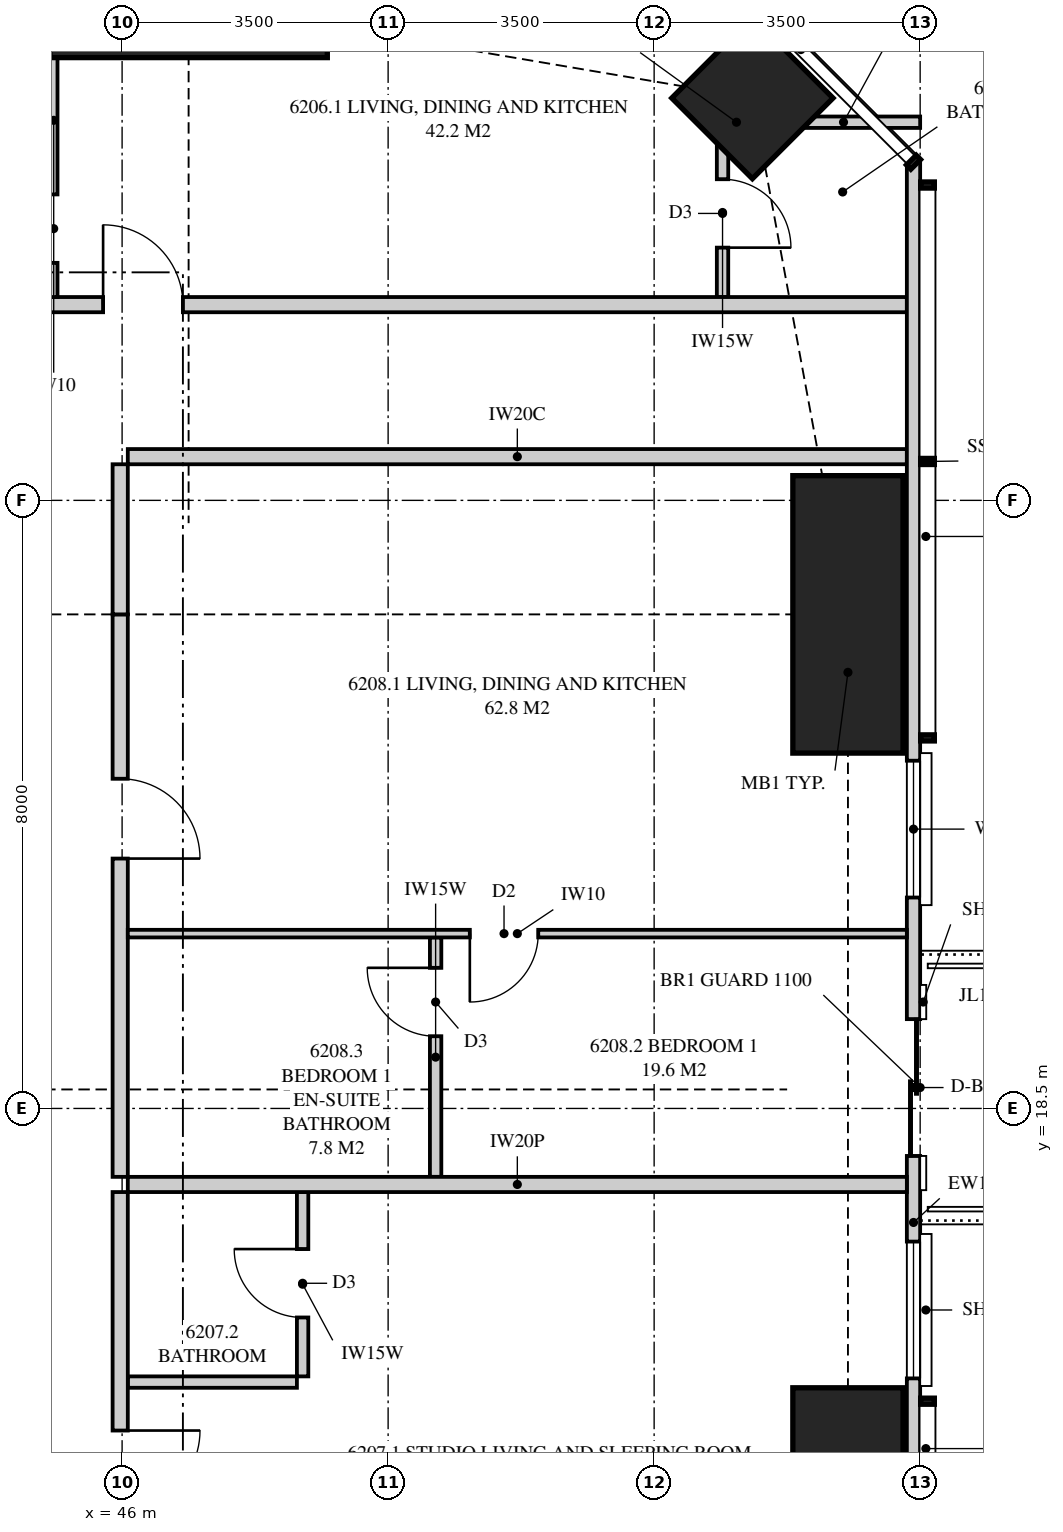
"""IFC4 building model, lengths in metres.
Left out: names, types, materials, properties, quantities, classifications, styles, units other than length and angle.
Written with IfcOpenShell. Run it as: python <this file> out.ifc"""

import sys

from ifc_helpers import new_model, si_unit, direction, frame, frame_2d, origin, origin_2d, place, context, subcontext, project, spatial, polyline, rectangle, outline, extrude, element, fill, save


model = new_model("IFC4")
c1 = context("Model", 3, precision=1e-05, world=origin(), true_north=direction((0.0, 1.0)))
c2 = subcontext(c1, "Body", "Model", "MODEL_VIEW")
j1 = project(units=[si_unit("LENGTHUNIT", "METRE"), si_unit("PLANEANGLEUNIT", "RADIAN")], contexts=[c1])
p1 = place(None, origin())
s1 = spatial("IfcSite", under=j1, at=p1, CompositionType="ELEMENT")
p2 = place(p1, origin())
s2 = spatial("IfcBuilding", under=s1, at=p2, CompositionType="ELEMENT")
p3 = place(p2, frame((0.0, 0.0, 228.45)))
s3 = spatial("IfcBuildingStorey", under=s2, at=p3, CompositionType="ELEMENT", Elevation=228.45)
for number, where, z_axis, x_axis in (
    (1, (55.55, 13.0, 0.0), (0.0, 0.0, 1.0), (1.0, 0.0, 0.0)),
    (2, (55.55, 25.0, 0.0), (0.0, 0.0, 1.0), (1.0, 0.0, 0.0)),
):
    element("IfcColumn", number, at=place(p3, frame(where, z_axis=z_axis, x_axis=x_axis)), inside=s3, PredefinedType="COLUMN", context=c2, shape_type="SweptSolid", body=[
        extrude(rectangle(XDim=1.45, YDim=3.65, at=origin_2d()), origin(), (0.0, 0.0, 1.0), 3.5),
    ])
p4 = place(p3, frame((54.293, 31.793, 0.0), z_axis=(0.0, 0.0, 1.0), x_axis=(0.707106781187, 0.707106781187, 0.0)))
e3 = element("IfcColumn", 3, at=p4, inside=s3, PredefinedType="COLUMN", context=c2, shape_type="SweptSolid", body=[
    extrude(rectangle(XDim=1.5, YDim=1.5, at=origin_2d()), origin(), (0.0, 0.0, 1.0), 3.5),
])
p5 = place(p3, frame((46.875, 33.05, 0.0), z_axis=(0.0, 0.0, 1.0), x_axis=(0.0, 1.0, 0.0)))
e4 = element("IfcColumn", 4, at=p5, inside=s3, PredefinedType="COLUMN", context=c2, shape_type="SweptSolid", body=[
    extrude(rectangle(XDim=1.45, YDim=3.65, at=origin_2d()), origin(), (0.0, 0.0, 1.0), 3.5),
])
p6 = place(p3, frame((56.413, 3.051, 0.0), z_axis=(0.0, 0.0, 1.0), x_axis=(0.0, 1.0, 0.0)))
e5 = element("IfcWall", 5, at=p6, inside=s3, PredefinedType="SOLIDWALL", context=c2, shape_type="SweptSolid", body=[
    extrude(outline(polyline([(0.0, 0.0), (27.897, 0.0), (27.897, 3.26), (22.157, 3.26), (22.157, 2.3), (22.092, 2.3), (22.092, 3.26), (21.949, 3.26), (21.949, 2.3), (9.949, 2.3), (9.949, 3.26), (9.858, 3.26), (9.858, 2.3), (9.688, 2.3), (9.688, 3.26), (0.0, 3.26), (0.0, 0.0)])), frame((0.0, 0.087, 0.0), z_axis=(0.0, -1.0, 0.0), x_axis=(1.0, 0.0, 0.0)), (0.0, 0.0, 1.0), 0.175),
])
p7 = place(p6, frame((1.187, 0.0, 0.4)))
e6 = element("IfcOpeningElement", 6, at=p7, cuts=e5, PredefinedType="OPENING", context=c2, shape_type="SweptSolid", body=[
    extrude(rectangle(XDim=2.4, YDim=1.85, at=frame_2d((1.2, 0.925))), frame((0.0, 0.097, 0.0), z_axis=(0.0, -1.0, 0.0), x_axis=(1.0, 0.0, 0.0)), (0.0, 0.0, 1.0), 0.195),
])
p8 = place(p6, frame((11.897, 0.0, 0.4)))
e7 = element("IfcOpeningElement", 7, at=p8, cuts=e5, PredefinedType="OPENING", context=c2, shape_type="SweptSolid", body=[
    extrude(rectangle(XDim=1.8, YDim=1.85, at=frame_2d((0.9, 0.925))), frame((0.0, 0.097, 0.0), z_axis=(0.0, -1.0, 0.0), x_axis=(1.0, 0.0, 0.0)), (0.0, 0.0, 1.0), 0.195),
])
p9 = place(p6, frame((14.824, 0.0, 0.0)))
e8 = element("IfcOpeningElement", 8, at=p9, cuts=e5, PredefinedType="OPENING", context=c2, shape_type="SweptSolid", body=[
    extrude(rectangle(XDim=1.8, YDim=2.25, at=frame_2d((0.9, 1.125))), frame((0.0, 0.097, 0.0), z_axis=(0.0, -1.0, 0.0), x_axis=(1.0, 0.0, 0.0)), (0.0, 0.0, 1.0), 0.195),
])
p10 = place(p6, frame((18.224, 0.0, 0.4)))
e9 = element("IfcOpeningElement", 9, at=p10, cuts=e5, PredefinedType="OPENING", context=c2, shape_type="SweptSolid", body=[
    extrude(rectangle(XDim=1.8, YDim=1.85, at=frame_2d((0.9, 0.925))), frame((0.0, 0.097, 0.0), z_axis=(0.0, -1.0, 0.0), x_axis=(1.0, 0.0, 0.0)), (0.0, 0.0, 1.0), 0.195),
])
p11 = place(p3, frame((46.075, 27.075, 0.0), z_axis=(0.0, 0.0, 1.0), x_axis=(1.0, 0.0, 0.0)))
e10 = element("IfcWall", 10, at=p11, inside=s3, PredefinedType="PARTITIONING", context=c2, shape_type="SweptSolid", body=[
    extrude(outline(polyline([(0.0, 0.0), (10.25, 0.0), (10.25, 3.26), (10.017, 3.26), (10.017, 2.3), (8.166, 2.3), (8.166, 3.26), (2.11, 3.26), (2.11, 2.66), (0.0, 2.66), (0.0, 3.26), (0.0, 0.0)])), frame((0.0, 0.1, 0.0), z_axis=(0.0, -1.0, 0.0), x_axis=(1.0, 0.0, 0.0)), (0.0, 0.0, 1.0), 0.2),
])
p12 = place(p3, frame((36.1, 29.075, 0.0), z_axis=(0.0, 0.0, 1.0), x_axis=(1.0, 0.0, 0.0)))
e11 = element("IfcWall", 11, at=p12, inside=s3, PredefinedType="PARTITIONING", context=c2, shape_type="SweptSolid", body=[
    extrude(outline(polyline([(0.0, 0.0), (20.225, 0.0), (20.225, 3.26), (19.621, 3.26), (19.621, 2.3), (17.771, 2.3), (17.771, 3.26), (12.085, 3.26), (12.085, 2.66), (9.465, 2.66), (9.465, 3.26), (2.46, 3.26), (2.46, 2.66), (0.0, 2.66), (0.0, 3.26), (0.0, 0.0)])), frame((0.0, 0.1, 0.0), z_axis=(0.0, -1.0, 0.0), x_axis=(1.0, 0.0, 0.0)), (0.0, 0.0, 1.0), 0.2),
])
p13 = place(p12, frame((9.65, 0.0, 0.0)))
e12 = element("IfcOpeningElement", 12, at=p13, cuts=e11, PredefinedType="OPENING", context=c2, shape_type="SweptSolid", body=[
    extrude(rectangle(XDim=1.05, YDim=2.2, at=frame_2d((0.525, 1.1))), frame((0.0, 0.11, 0.0), z_axis=(0.0, -1.0, 0.0), x_axis=(1.0, 0.0, 0.0)), (0.0, 0.0, 1.0), 0.22),
])
p14 = place(p3, frame((53.975, 31.475, 0.0), z_axis=(0.0, 0.0, 1.0), x_axis=(1.0, 0.0, 0.0)))
e13 = element("IfcWall", 13, at=p14, inside=s3, PredefinedType="PLUMBINGWALL", context=c2, shape_type="SweptSolid", body=[
    extrude(rectangle(XDim=0.217, YDim=0.15, at=frame_2d((0.108, 0.0))), origin(), (0.0, 0.0, 1.0), 2.3),
])
p15 = place(p3, frame((54.483, 31.475, 0.0), z_axis=(0.0, 0.0, 1.0), x_axis=(1.0, 0.0, 0.0)))
e14 = element("IfcWall", 14, at=p15, inside=s3, PredefinedType="PLUMBINGWALL", context=c2, shape_type="SweptSolid", body=[
    extrude(outline(polyline([(0.768, 3.26), (0.768, 2.3), (0.407, 2.3), (0.396, 2.239), (0.0, 1.15), (0.396, 0.061), (0.407, 0.0), (2.017, 0.0), (2.017, 3.26), (0.768, 3.26)])), frame((0.0, 0.075, 0.0), z_axis=(0.0, -1.0, 0.0), x_axis=(1.0, 0.0, 0.0)), (0.0, 0.0, 1.0), 0.15),
])
p16 = place(p3, frame((53.9, 31.4, 0.0), z_axis=(0.0, 0.0, 1.0), x_axis=(0.0, -1.0, 0.0)))
e15 = element("IfcWall", 15, at=p16, inside=s3, PredefinedType="PLUMBINGWALL", context=c2, shape_type="SweptSolid", body=[
    extrude(outline(polyline([(0.0, 0.0), (2.225, 0.0), (2.225, 3.26), (2.225, 2.3), (0.438, 2.3), (0.0, 2.3), (0.0, 3.26), (0.0, 0.0)])), frame((0.0, 0.075, 0.0), z_axis=(0.0, -1.0, 0.0), x_axis=(1.0, 0.0, 0.0)), (0.0, 0.0, 1.0), 0.15),
])
p17 = place(p16, frame((0.675, 0.0, 0.0)))
e16 = element("IfcOpeningElement", 16, at=p17, cuts=e15, PredefinedType="OPENING", context=c2, shape_type="SweptSolid", body=[
    extrude(rectangle(XDim=0.9, YDim=2.1, at=frame_2d((0.45, 1.05))), frame((0.0, 0.085, 0.0), z_axis=(0.0, -1.0, 0.0), x_axis=(1.0, 0.0, 0.0)), (0.0, 0.0, 1.0), 0.17),
])
p18 = place(p3, frame((45.1, 33.825, 0.0), z_axis=(0.0, 0.0, 1.0), x_axis=(0.0, -1.0, 0.0)))
e17 = element("IfcWall", 17, at=p18, inside=s3, PredefinedType="PARTITIONING", context=c2, shape_type="SweptSolid", body=[
    extrude(outline(polyline([(0.0, 0.0), (4.65, 0.0), (4.65, 3.26), (1.635, 3.26), (1.635, 2.3), (0.0, 2.3), (0.0, 3.26), (0.0, 0.0)])), frame((0.0, 0.05, 0.0), z_axis=(0.0, -1.0, 0.0), x_axis=(1.0, 0.0, 0.0)), (0.0, 0.0, 1.0), 0.1),
])
p19 = place(p18, frame((3.3, 0.0, 0.0)))
e18 = element("IfcOpeningElement", 18, at=p19, cuts=e17, PredefinedType="OPENING", context=c2, shape_type="SweptSolid", body=[
    extrude(rectangle(XDim=0.9, YDim=2.1, at=frame_2d((0.45, 1.05))), frame((0.0, 0.06, 0.0), z_axis=(0.0, -1.0, 0.0), x_axis=(1.0, 0.0, 0.0)), (0.0, 0.0, 1.0), 0.12),
])
p20 = place(p3, frame((56.325, 17.5, 0.0), z_axis=(0.0, 0.0, 1.0), x_axis=(-1.0, 0.0, 0.0)))
e19 = element("IfcWall", 19, at=p20, inside=s3, PredefinedType="PARTITIONING", context=c2, shape_type="SweptSolid", body=[
    extrude(outline(polyline([(0.0, 0.0), (10.25, 0.0), (10.25, 3.26), (10.25, 2.66), (1.685, 2.66), (1.685, 2.3), (0.0, 2.3), (0.0, 3.26), (0.0, 0.0)])), frame((0.0, 0.1, 0.0), z_axis=(0.0, -1.0, 0.0), x_axis=(1.0, 0.0, 0.0)), (0.0, 0.0, 1.0), 0.2),
])
p21 = place(p3, frame((45.975, 13.0, 0.0), z_axis=(0.0, 0.0, 1.0), x_axis=(0.0, 1.0, 0.0)))
e20 = element("IfcWall", 20, at=p21, inside=s3, PredefinedType="PARTITIONING", context=c2, shape_type="SweptSolid", body=[
    extrude(outline(polyline([(0.0, 0.0), (4.4, 0.0), (4.4, 3.26), (1.31, 3.26), (1.31, 2.66), (0.0, 2.66), (0.0, 0.0)])), frame((0.0, 0.1, 0.0), z_axis=(0.0, -1.0, 0.0), x_axis=(1.0, 0.0, 0.0)), (0.0, 0.0, 1.0), 0.2),
])
p22 = place(p21, frame((0.212, 0.0, 0.0)))
e21 = element("IfcOpeningElement", 21, at=p22, cuts=e20, PredefinedType="OPENING", context=c2, shape_type="SweptSolid", body=[
    extrude(rectangle(XDim=1.05, YDim=2.2, at=frame_2d((0.525, 1.1))), frame((0.0, 0.11, 0.0), z_axis=(0.0, -1.0, 0.0), x_axis=(1.0, 0.0, 0.0)), (0.0, 0.0, 1.0), 0.22),
])
p23 = place(p3, frame((48.375, 14.975, 0.0), z_axis=(0.0, 0.0, 1.0), x_axis=(0.0, 1.0, 0.0)))
e22 = element("IfcWall", 22, at=p23, inside=s3, PredefinedType="PLUMBINGWALL", context=c2, shape_type="SweptSolid", body=[
    extrude(rectangle(XDim=2.425, YDim=0.15, at=frame_2d((1.212, 0.0))), origin(), (0.0, 0.0, 1.0), 3.26),
])
p24 = place(p23, frame((0.775, 0.0, 0.0)))
e23 = element("IfcOpeningElement", 23, at=p24, cuts=e22, PredefinedType="OPENING", context=c2, shape_type="SweptSolid", body=[
    extrude(rectangle(XDim=0.9, YDim=2.1, at=frame_2d((0.45, 1.05))), frame((0.0, 0.085, 0.0), z_axis=(0.0, -1.0, 0.0), x_axis=(1.0, 0.0, 0.0)), (0.0, 0.0, 1.0), 0.17),
])
p25 = place(p3, frame((48.3, 14.9, 0.0), z_axis=(0.0, 0.0, 1.0), x_axis=(-1.0, 0.0, 0.0)))
e24 = element("IfcWall", 24, at=p25, inside=s3, PredefinedType="PLUMBINGWALL", context=c2, shape_type="SweptSolid", body=[
    extrude(rectangle(XDim=2.225, YDim=0.15, at=frame_2d((1.113, 0.0))), origin(), (0.0, 0.0, 1.0), 3.26),
])
p26 = place(p3, frame((45.975, 17.6, 0.0), z_axis=(0.0, 0.0, 1.0), x_axis=(0.0, 1.0, 0.0)))
e25 = element("IfcWall", 25, at=p26, inside=s3, PredefinedType="PARTITIONING", context=c2, shape_type="SweptSolid", body=[
    extrude(outline(polyline([(0.0, 0.0), (7.4, 0.0), (7.4, 2.66), (6.09, 2.66), (6.09, 3.26), (2.46, 3.26), (2.46, 2.66), (0.0, 2.66), (0.0, 0.0)])), frame((0.0, 0.1, 0.0), z_axis=(0.0, -1.0, 0.0), x_axis=(1.0, 0.0, 0.0)), (0.0, 0.0, 1.0), 0.2),
])
p27 = place(p26, frame((4.188, 0.0, 0.0)))
e26 = element("IfcOpeningElement", 26, at=p27, cuts=e25, PredefinedType="OPENING", context=c2, shape_type="SweptSolid", body=[
    extrude(rectangle(XDim=1.05, YDim=2.2, at=frame_2d((0.525, 1.1))), frame((0.0, 0.11, 0.0), z_axis=(0.0, -1.0, 0.0), x_axis=(1.0, 0.0, 0.0)), (0.0, 0.0, 1.0), 0.22),
])
p28 = place(p3, frame((45.975, 25.0, 0.0), z_axis=(0.0, 0.0, 1.0), x_axis=(0.0, 1.0, 0.0)))
e27 = element("IfcWall", 27, at=p28, inside=s3, PredefinedType="PARTITIONING", context=c2, shape_type="SweptSolid", body=[
    extrude(rectangle(XDim=1.975, YDim=0.2, at=frame_2d((0.988, 0.0))), origin(), (0.0, 0.0, 1.0), 2.66),
])
p29 = place(p3, frame((56.325, 20.8, 0.0), z_axis=(0.0, 0.0, 1.0), x_axis=(-1.0, 0.0, 0.0)))
e28 = element("IfcWall", 28, at=p29, inside=s3, PredefinedType="PARTITIONING", context=c2, shape_type="SweptSolid", body=[
    extrude(outline(polyline([(0.0, 0.0), (10.25, 0.0), (10.25, 3.26), (1.635, 3.26), (1.635, 2.3), (0.0, 2.3), (0.0, 3.26), (0.0, 0.0)])), frame((0.0, 0.05, 0.0), z_axis=(0.0, -1.0, 0.0), x_axis=(1.0, 0.0, 0.0)), (0.0, 0.0, 1.0), 0.1),
])
p30 = place(p29, frame((4.85, 0.0, 0.0)))
e29 = element("IfcOpeningElement", 29, at=p30, cuts=e28, PredefinedType="OPENING", context=c2, shape_type="SweptSolid", body=[
    extrude(rectangle(XDim=0.9, YDim=2.1, at=frame_2d((0.45, 1.05))), frame((0.0, 0.06, 0.0), z_axis=(0.0, -1.0, 0.0), x_axis=(1.0, 0.0, 0.0)), (0.0, 0.0, 1.0), 0.12),
])
p31 = place(p3, frame((50.125, 17.6, 0.0), z_axis=(0.0, 0.0, 1.0), x_axis=(0.0, 1.0, 0.0)))
e30 = element("IfcWall", 30, at=p31, inside=s3, PredefinedType="PLUMBINGWALL", context=c2, shape_type="SweptSolid", body=[
    extrude(outline(polyline([(0.0, 0.0), (3.15, 0.0), (3.15, 3.26), (2.435, 3.26), (2.435, 2.66), (0.0, 2.66), (0.0, 3.26), (0.0, 0.0)])), frame((0.0, 0.075, 0.0), z_axis=(0.0, -1.0, 0.0), x_axis=(1.0, 0.0, 0.0)), (0.0, 0.0, 1.0), 0.15),
])
p32 = place(p31, frame((1.85, 0.0, 0.0)))
e31 = element("IfcOpeningElement", 31, at=p32, cuts=e30, PredefinedType="OPENING", context=c2, shape_type="SweptSolid", body=[
    extrude(rectangle(XDim=0.9, YDim=2.1, at=frame_2d((0.45, 1.05))), frame((0.0, 0.085, 0.0), z_axis=(0.0, -1.0, 0.0), x_axis=(1.0, 0.0, 0.0)), (0.0, 0.0, 1.0), 0.17),
])
p33 = place(p8, origin())
e32 = element("IfcWindow", 32, at=p33, inside=s3, PartitioningType="SINGLE_PANEL", PredefinedType="WINDOW", context=c2, shape_type="SweptSolid", body=[
    extrude(rectangle(XDim=1.8, YDim=1.85, at=frame_2d((0.9, 0.925))), frame((0.0, 0.03, 0.0), z_axis=(0.0, -1.0, 0.0), x_axis=(1.0, 0.0, 0.0)), (0.0, 0.0, 1.0), 0.06),
])
fill(e7, e32)
p34 = place(p9, origin())
e33 = element("IfcDoor", 33, at=p34, inside=s3, OperationType="SLIDING_TO_LEFT", PredefinedType="DOOR", context=c2, shape_type="SweptSolid", body=[
    extrude(rectangle(XDim=1.8, YDim=2.25, at=frame_2d((0.9, 1.125))), frame((0.0, 0.025, 0.0), z_axis=(0.0, -1.0, 0.0), x_axis=(1.0, 0.0, 0.0)), (0.0, 0.0, 1.0), 0.05),
])
fill(e8, e33)
p35 = place(p10, origin())
e34 = element("IfcWindow", 34, at=p35, inside=s3, PartitioningType="SINGLE_PANEL", PredefinedType="WINDOW", context=c2, shape_type="SweptSolid", body=[
    extrude(rectangle(XDim=1.8, YDim=1.85, at=frame_2d((0.9, 0.925))), frame((0.0, 0.03, 0.0), z_axis=(0.0, -1.0, 0.0), x_axis=(1.0, 0.0, 0.0)), (0.0, 0.0, 1.0), 0.06),
])
fill(e9, e34)
p36 = place(p13, origin())
e35 = element("IfcDoor", 35, at=p36, inside=s3, OperationType="SINGLE_SWING_LEFT", PredefinedType="DOOR", context=c2, shape_type="SweptSolid", body=[
    extrude(rectangle(XDim=1.05, YDim=2.2, at=frame_2d((0.525, 1.1))), frame((0.0, 0.025, 0.0), z_axis=(0.0, -1.0, 0.0), x_axis=(1.0, 0.0, 0.0)), (0.0, 0.0, 1.0), 0.05),
])
fill(e12, e35)
p37 = place(p17, origin())
e36 = element("IfcDoor", 36, at=p37, inside=s3, OperationType="SINGLE_SWING_RIGHT", PredefinedType="DOOR", context=c2, shape_type="SweptSolid", body=[
    extrude(rectangle(XDim=0.9, YDim=2.1, at=frame_2d((0.45, 1.05))), frame((0.0, 0.025, 0.0), z_axis=(0.0, -1.0, 0.0), x_axis=(1.0, 0.0, 0.0)), (0.0, 0.0, 1.0), 0.05),
])
fill(e16, e36)
p38 = place(p19, frame((0.9, 0.0, 0.0), z_axis=(0.0, 0.0, 1.0), x_axis=(-1.0, 0.0, 0.0)))
e37 = element("IfcDoor", 37, at=p38, inside=s3, OperationType="SINGLE_SWING_LEFT", PredefinedType="DOOR", context=c2, shape_type="SweptSolid", body=[
    extrude(rectangle(XDim=0.9, YDim=2.1, at=frame_2d((0.45, 1.05))), frame((0.0, 0.025, 0.0), z_axis=(0.0, -1.0, 0.0), x_axis=(1.0, 0.0, 0.0)), (0.0, 0.0, 1.0), 0.05),
])
fill(e18, e37)
p39 = place(p22, frame((1.05, 0.0, 0.0), z_axis=(0.0, 0.0, 1.0), x_axis=(-1.0, 0.0, 0.0)))
e38 = element("IfcDoor", 38, at=p39, inside=s3, OperationType="SINGLE_SWING_LEFT", PredefinedType="DOOR", context=c2, shape_type="SweptSolid", body=[
    extrude(rectangle(XDim=1.05, YDim=2.2, at=frame_2d((0.525, 1.1))), frame((0.0, 0.025, 0.0), z_axis=(0.0, -1.0, 0.0), x_axis=(1.0, 0.0, 0.0)), (0.0, 0.0, 1.0), 0.05),
])
fill(e21, e38)
p40 = place(p24, origin())
e39 = element("IfcDoor", 39, at=p40, inside=s3, OperationType="SINGLE_SWING_RIGHT", PredefinedType="DOOR", context=c2, shape_type="SweptSolid", body=[
    extrude(rectangle(XDim=0.9, YDim=2.1, at=frame_2d((0.45, 1.05))), frame((0.0, 0.025, 0.0), z_axis=(0.0, -1.0, 0.0), x_axis=(1.0, 0.0, 0.0)), (0.0, 0.0, 1.0), 0.05),
])
fill(e23, e39)
p41 = place(p27, frame((1.05, 0.0, 0.0), z_axis=(0.0, 0.0, 1.0), x_axis=(-1.0, 0.0, 0.0)))
e40 = element("IfcDoor", 40, at=p41, inside=s3, OperationType="SINGLE_SWING_RIGHT", PredefinedType="DOOR", context=c2, shape_type="SweptSolid", body=[
    extrude(rectangle(XDim=1.05, YDim=2.2, at=frame_2d((0.525, 1.1))), frame((0.0, 0.025, 0.0), z_axis=(0.0, -1.0, 0.0), x_axis=(1.0, 0.0, 0.0)), (0.0, 0.0, 1.0), 0.05),
])
fill(e26, e40)
p42 = place(p30, origin())
e41 = element("IfcDoor", 41, at=p42, inside=s3, OperationType="SINGLE_SWING_RIGHT", PredefinedType="DOOR", context=c2, shape_type="SweptSolid", body=[
    extrude(rectangle(XDim=0.9, YDim=2.1, at=frame_2d((0.45, 1.05))), frame((0.0, 0.025, 0.0), z_axis=(0.0, -1.0, 0.0), x_axis=(1.0, 0.0, 0.0)), (0.0, 0.0, 1.0), 0.05),
])
fill(e29, e41)
p43 = place(p32, origin())
e42 = element("IfcDoor", 42, at=p43, inside=s3, OperationType="SINGLE_SWING_RIGHT", PredefinedType="DOOR", context=c2, shape_type="SweptSolid", body=[
    extrude(rectangle(XDim=0.9, YDim=2.1, at=frame_2d((0.45, 1.05))), frame((0.0, 0.025, 0.0), z_axis=(0.0, -1.0, 0.0), x_axis=(1.0, 0.0, 0.0)), (0.0, 0.0, 1.0), 0.05),
])
fill(e31, e42)
save(model, sys.argv[1])
